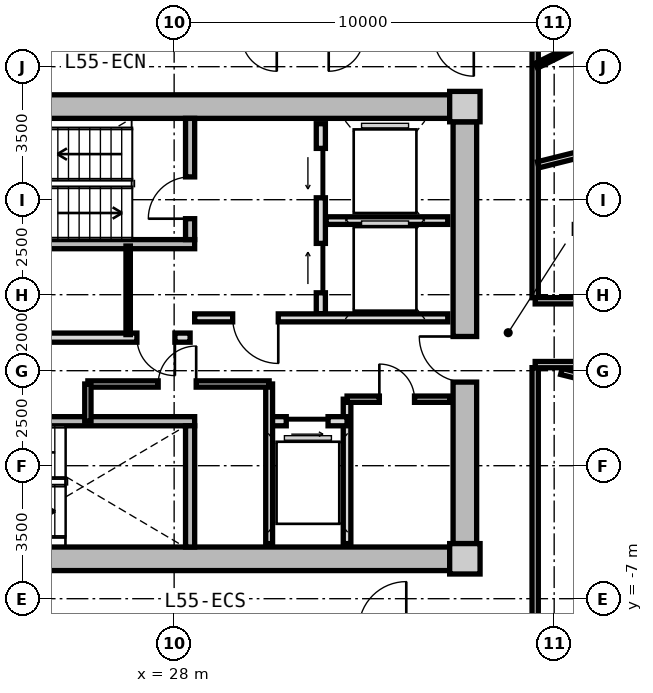
"""IFC4 building model, lengths in metres.
Left out: names, types, materials, properties, quantities, classifications, styles, units other than length and angle.
Written with IfcOpenShell. Run it as: python <this file> out.ifc"""

import sys

from ifc_helpers import new_model, si_unit, direction, frame, frame_2d, origin, origin_2d, place, context, subcontext, project, spatial, rectangle, extrude, source, transform, mapped, element, fill, save


model = new_model("IFC4")
c1 = context("Model", 3, precision=1e-05, world=origin(), true_north=direction((0.0, 1.0)))
c2 = subcontext(c1, "Body", "Model", "MODEL_VIEW")
j1 = project(units=[si_unit("LENGTHUNIT", "METRE"), si_unit("PLANEANGLEUNIT", "RADIAN")], contexts=[c1])
p1 = place(None, origin())
s1 = spatial("IfcSite", under=j1, at=p1, CompositionType="ELEMENT")
p2 = place(p1, origin())
s2 = spatial("IfcBuilding", under=s1, at=p2, CompositionType="ELEMENT")
p3 = place(p2, frame((0.0, 0.0, 177.0)))
s3 = spatial("IfcBuildingStorey", under=s2, at=p3, CompositionType="ELEMENT", Elevation=177.0)
m1 = source(origin(), c2, "Body", "SweptSolid", [
    extrude(rectangle(XDim=0.8, YDim=0.8, at=origin_2d()), origin(), (0.0, 0.0, 1.0), 3.05),
])
for number, where, z_axis, x_axis in (
    (1, (35.65, -5.95, 0.0), (0.0, 0.0, 1.0), (1.0, 0.0, 0.0)),
    (2, (35.65, 5.95, 0.0), (0.0, 0.0, 1.0), (1.0, 0.0, 0.0)),
):
    element("IfcColumn", number, at=place(p3, frame(where, z_axis=z_axis, x_axis=x_axis)), inside=s3, PredefinedType="COLUMN", context=c2, shape_type="MappedRepresentation", body=[
        mapped(m1, transform((0.0, 0.0, 0.0), x_axis=(1.0, 0.0, 0.0), y_axis=(0.0, 1.0, 0.0), z_axis=(0.0, 0.0, 1.0), scale=1.0)),
    ])
m2 = source(origin(), c2, "Body", "SweptSolid", [
    extrude(rectangle(XDim=14.5, YDim=0.62, at=frame_2d((7.25, 0.0))), origin(), (0.0, 0.0, 1.0), 2.81),
])
for number, where, z_axis, x_axis in (
    (3, (20.75, 5.95, 0.0), (0.0, 0.0, 1.0), (1.0, 0.0, 0.0)),
    (4, (35.25, -5.95, 0.0), (0.0, 0.0, 1.0), (-1.0, 0.0, 0.0)),
):
    element("IfcWall", number, at=place(p3, frame(where, z_axis=z_axis, x_axis=x_axis)), inside=s3, PredefinedType="SHEAR", context=c2, shape_type="MappedRepresentation", body=[
        mapped(m2, transform((0.0, 0.0, 0.0), x_axis=(1.0, 0.0, 0.0), y_axis=(0.0, 1.0, 0.0), z_axis=(0.0, 0.0, 1.0), scale=1.0)),
    ])
m3 = source(origin(), c2, "Body", "SweptSolid", [
    extrude(rectangle(XDim=11.1, YDim=0.62, at=frame_2d((5.55, 0.0))), origin(), (0.0, 0.0, 1.0), 2.81),
])
p4 = place(p3, frame((35.65, 5.55, 0.0), z_axis=(0.0, 0.0, 1.0), x_axis=(0.0, -1.0, 0.0)))
e5 = element("IfcWall", 5, at=p4, inside=s3, PredefinedType="SHEAR", context=c2, shape_type="MappedRepresentation", body=[
    mapped(m3, transform((0.0, 0.0, 0.0), x_axis=(1.0, 0.0, 0.0), y_axis=(0.0, 1.0, 0.0), z_axis=(0.0, 0.0, 1.0), scale=1.0)),
])
p5 = place(p4, frame((5.65, 0.0, 0.0)))
e6 = element("IfcOpeningElement", 6, at=p5, cuts=e5, PredefinedType="OPENING", context=c2, shape_type="SweptSolid", body=[
    extrude(rectangle(XDim=1.2, YDim=2.15, at=frame_2d((0.6, 1.075))), frame((0.0, 0.32, 0.0), z_axis=(0.0, -1.0, 0.0), x_axis=(1.0, 0.0, 0.0)), (0.0, 0.0, 1.0), 0.64),
])
m4 = source(origin(), c2, "Body", "SweptSolid", [
    extrude(rectangle(XDim=7.88, YDim=0.24, at=frame_2d((3.94, 0.0))), origin(), (0.0, 0.0, 1.0), 2.81),
])
p6 = place(p3, frame((20.66, 2.33, 0.0), z_axis=(0.0, 0.0, 1.0), x_axis=(1.0, 0.0, 0.0)))
e7 = element("IfcWall", 7, at=p6, inside=s3, PredefinedType="PARTITIONING", context=c2, shape_type="MappedRepresentation", body=[
    mapped(m4, transform((0.0, 0.0, 0.0), x_axis=(1.0, 0.0, 0.0), y_axis=(0.0, 1.0, 0.0), z_axis=(0.0, 0.0, 1.0), scale=1.0)),
])
m5 = source(origin(), c2, "Body", "SweptSolid", [
    extrude(rectangle(XDim=3.19, YDim=0.24, at=frame_2d((1.595, 0.0))), origin(), (0.0, 0.0, 1.0), 2.81),
])
p7 = place(p3, frame((28.42, 2.45, 0.0), z_axis=(0.0, 0.0, 1.0), x_axis=(0.0, 1.0, 0.0)))
e8 = element("IfcWall", 8, at=p7, inside=s3, PredefinedType="PARTITIONING", context=c2, shape_type="MappedRepresentation", body=[
    mapped(m5, transform((0.0, 0.0, 0.0), x_axis=(1.0, 0.0, 0.0), y_axis=(0.0, 1.0, 0.0), z_axis=(0.0, 0.0, 1.0), scale=1.0)),
])
p8 = place(p7, frame((0.55, 0.0, 0.0)))
e9 = element("IfcOpeningElement", 9, at=p8, cuts=e8, PredefinedType="OPENING", context=c2, shape_type="SweptSolid", body=[
    extrude(rectangle(XDim=1.1, YDim=2.15, at=frame_2d((0.55, 1.075))), frame((0.0, 0.13, 0.0), z_axis=(0.0, -1.0, 0.0), x_axis=(1.0, 0.0, 0.0)), (0.0, 0.0, 1.0), 0.26),
])
p9 = place(p3, frame((20.66, -2.33, 0.0), z_axis=(0.0, 0.0, 1.0), x_axis=(1.0, 0.0, 0.0)))
e10 = element("IfcWall", 10, at=p9, inside=s3, PredefinedType="PARTITIONING", context=c2, shape_type="MappedRepresentation", body=[
    mapped(m4, transform((0.0, 0.0, 0.0), x_axis=(1.0, 0.0, 0.0), y_axis=(0.0, 1.0, 0.0), z_axis=(0.0, 0.0, 1.0), scale=1.0)),
])
p10 = place(p9, frame((1.0, 0.0, 0.0)))
e11 = element("IfcOpeningElement", 11, at=p10, cuts=e10, PredefinedType="OPENING", context=c2, shape_type="SweptSolid", body=[
    extrude(rectangle(XDim=1.1, YDim=2.15, at=frame_2d((0.55, 1.075))), frame((0.0, 0.13, 0.0), z_axis=(0.0, -1.0, 0.0), x_axis=(1.0, 0.0, 0.0)), (0.0, 0.0, 1.0), 0.26),
])
p11 = place(p3, frame((28.42, -5.64, 0.0), z_axis=(0.0, 0.0, 1.0), x_axis=(0.0, 1.0, 0.0)))
e12 = element("IfcWall", 12, at=p11, inside=s3, PredefinedType="PARTITIONING", context=c2, shape_type="MappedRepresentation", body=[
    mapped(m5, transform((0.0, 0.0, 0.0), x_axis=(1.0, 0.0, 0.0), y_axis=(0.0, 1.0, 0.0), z_axis=(0.0, 0.0, 1.0), scale=1.0)),
])
m6 = source(origin(), c2, "Body", "SweptSolid", [
    extrude(rectangle(XDim=5.0, YDim=0.24, at=frame_2d((2.5, 0.0))), origin(), (0.0, 0.0, 1.0), 2.795),
])
p12 = place(p3, frame((31.86, 0.5, 0.0), z_axis=(0.0, 0.0, 1.0), x_axis=(0.0, 1.0, 0.0)))
e13 = element("IfcWall", 13, at=p12, inside=s3, PredefinedType="PARTITIONING", context=c2, shape_type="MappedRepresentation", body=[
    mapped(m6, transform((0.0, 0.0, 0.0), x_axis=(1.0, 0.0, 0.0), y_axis=(0.0, 1.0, 0.0), z_axis=(0.0, 0.0, 1.0), scale=1.0)),
])
p13 = place(p12, frame((3.05, 0.0, 0.0)))
e14 = element("IfcOpeningElement", 14, at=p13, cuts=e13, PredefinedType="OPENING", context=c2, shape_type="SweptSolid", body=[
    extrude(rectangle(XDim=1.3, YDim=2.2, at=frame_2d((0.65, 1.1))), frame((0.0, 0.13, 0.0), z_axis=(0.0, -1.0, 0.0), x_axis=(1.0, 0.0, 0.0)), (0.0, 0.0, 1.0), 0.26),
])
p14 = place(p12, frame((0.55, 0.0, 0.0)))
e15 = element("IfcOpeningElement", 15, at=p14, cuts=e13, PredefinedType="OPENING", context=c2, shape_type="SweptSolid", body=[
    extrude(rectangle(XDim=1.3, YDim=2.2, at=frame_2d((0.65, 1.1))), frame((0.0, 0.13, 0.0), z_axis=(0.0, -1.0, 0.0), x_axis=(1.0, 0.0, 0.0)), (0.0, 0.0, 1.0), 0.26),
])
m7 = source(origin(), c2, "Body", "SweptSolid", [
    extrude(rectangle(XDim=3.2, YDim=0.2, at=frame_2d((1.6, 0.0))), origin(), (0.0, 0.0, 1.0), 2.795),
])
p15 = place(p3, frame((32.0, 2.95, 0.0), z_axis=(0.0, 0.0, 1.0), x_axis=(1.0, 0.0, 0.0)))
e16 = element("IfcWall", 16, at=p15, inside=s3, PredefinedType="PARTITIONING", context=c2, shape_type="MappedRepresentation", body=[
    mapped(m7, transform((0.0, 0.0, 0.0), x_axis=(1.0, 0.0, 0.0), y_axis=(0.0, 1.0, 0.0), z_axis=(0.0, 0.0, 1.0), scale=1.0)),
])
m8 = source(origin(), c2, "Body", "SweptSolid", [
    extrude(rectangle(XDim=6.66, YDim=0.21, at=frame_2d((3.33, 0.0))), origin(), (0.0, 0.0, 1.0), 2.795),
])
p16 = place(p3, frame((28.54, 0.39, 0.0), z_axis=(0.0, 0.0, 1.0), x_axis=(1.0, 0.0, 0.0)))
e17 = element("IfcWall", 17, at=p16, inside=s3, PredefinedType="PARTITIONING", context=c2, shape_type="MappedRepresentation", body=[
    mapped(m8, transform((0.0, 0.0, 0.0), x_axis=(1.0, 0.0, 0.0), y_axis=(0.0, 1.0, 0.0), z_axis=(0.0, 0.0, 1.0), scale=1.0)),
])
p17 = place(p16, frame((1.0, 0.0, 0.0)))
e18 = element("IfcOpeningElement", 18, at=p17, cuts=e17, PredefinedType="OPENING", context=c2, shape_type="SweptSolid", body=[
    extrude(rectangle(XDim=1.2, YDim=2.15, at=frame_2d((0.6, 1.075))), frame((0.0, 0.115, 0.0), z_axis=(0.0, -1.0, 0.0), x_axis=(1.0, 0.0, 0.0)), (0.0, 0.0, 1.0), 0.23),
])
m9 = source(origin(), c2, "Body", "SweptSolid", [
    extrude(rectangle(XDim=7.62, YDim=0.24, at=frame_2d((3.81, 0.0))), origin(), (0.0, 0.0, 1.0), 2.795),
])
p18 = place(p3, frame((20.8, -0.13, 0.0), z_axis=(0.0, 0.0, 1.0), x_axis=(1.0, 0.0, 0.0)))
e19 = element("IfcWall", 19, at=p18, inside=s3, PredefinedType="PARTITIONING", context=c2, shape_type="MappedRepresentation", body=[
    mapped(m9, transform((0.0, 0.0, 0.0), x_axis=(1.0, 0.0, 0.0), y_axis=(0.0, 1.0, 0.0), z_axis=(0.0, 0.0, 1.0), scale=1.0)),
])
p19 = place(p18, frame((6.22, 0.0, 0.0)))
e20 = element("IfcOpeningElement", 20, at=p19, cuts=e19, PredefinedType="OPENING", context=c2, shape_type="SweptSolid", body=[
    extrude(rectangle(XDim=1.0, YDim=2.1, at=frame_2d((0.5, 1.05))), frame((0.0, 0.13, 0.0), z_axis=(0.0, -1.0, 0.0), x_axis=(1.0, 0.0, 0.0)), (0.0, 0.0, 1.0), 0.26),
])
p20 = place(p18, frame((2.4, 0.0, 0.0)))
e21 = element("IfcOpeningElement", 21, at=p20, cuts=e19, PredefinedType="OPENING", context=c2, shape_type="SweptSolid", body=[
    extrude(rectangle(XDim=1.0, YDim=2.1, at=frame_2d((0.5, 1.05))), frame((0.0, 0.13, 0.0), z_axis=(0.0, -1.0, 0.0), x_axis=(1.0, 0.0, 0.0)), (0.0, 0.0, 1.0), 0.26),
])
m10 = source(origin(), c2, "Body", "SweptSolid", [
    extrude(rectangle(XDim=2.33, YDim=0.115, at=frame_2d((1.165, 0.0))), origin(), (0.0, 0.0, 1.0), 2.795),
])
p21 = place(p3, frame((26.79, -0.05, 0.0), z_axis=(0.0, 0.0, 1.0), x_axis=(0.0, 1.0, 0.0)))
e22 = element("IfcWall", 22, at=p21, inside=s3, PredefinedType="PARTITIONING", context=c2, shape_type="MappedRepresentation", body=[
    mapped(m10, transform((0.0, 0.0, 0.0), x_axis=(1.0, 0.0, 0.0), y_axis=(0.0, 1.0, 0.0), z_axis=(0.0, 0.0, 1.0), scale=1.0)),
])
m11 = source(origin(), c2, "Body", "SweptSolid", [
    extrude(rectangle(XDim=3.8, YDim=0.2, at=frame_2d((1.9, 0.0))), origin(), (0.0, 0.0, 1.0), 2.795),
])
p22 = place(p3, frame((32.55, -5.55, 0.0), z_axis=(0.0, 0.0, 1.0), x_axis=(0.0, 1.0, 0.0)))
e23 = element("IfcWall", 23, at=p22, inside=s3, PredefinedType="PARTITIONING", context=c2, shape_type="MappedRepresentation", body=[
    mapped(m11, transform((0.0, 0.0, 0.0), x_axis=(1.0, 0.0, 0.0), y_axis=(0.0, 1.0, 0.0), z_axis=(0.0, 0.0, 1.0), scale=1.0)),
])
m12 = source(origin(), c2, "Body", "SweptSolid", [
    extrude(rectangle(XDim=2.05, YDim=0.24, at=frame_2d((1.025, 0.0))), origin(), (0.0, 0.0, 1.0), 2.795),
])
p23 = place(p3, frame((30.5, -2.33, 0.0), z_axis=(0.0, 0.0, 1.0), x_axis=(1.0, 0.0, 0.0)))
e24 = element("IfcWall", 24, at=p23, inside=s3, PredefinedType="PARTITIONING", context=c2, shape_type="MappedRepresentation", body=[
    mapped(m12, transform((0.0, 0.0, 0.0), x_axis=(1.0, 0.0, 0.0), y_axis=(0.0, 1.0, 0.0), z_axis=(0.0, 0.0, 1.0), scale=1.0)),
])
p24 = place(p23, frame((0.45, 0.0, 0.0)))
e25 = element("IfcOpeningElement", 25, at=p24, cuts=e24, PredefinedType="OPENING", context=c2, shape_type="SweptSolid", body=[
    extrude(rectangle(XDim=1.1, YDim=2.2, at=frame_2d((0.55, 1.1))), frame((0.0, 0.13, 0.0), z_axis=(0.0, -1.0, 0.0), x_axis=(1.0, 0.0, 0.0)), (0.0, 0.0, 1.0), 0.26),
])
m13 = source(origin(), c2, "Body", "SweptSolid", [
    extrude(rectangle(XDim=4.2, YDim=0.18, at=frame_2d((2.1, 0.0))), origin(), (0.0, 0.0, 1.0), 2.795),
])
p25 = place(p3, frame((30.5, -5.55, 0.0), z_axis=(0.0, 0.0, 1.0), x_axis=(0.0, 1.0, 0.0)))
e26 = element("IfcWall", 26, at=p25, inside=s3, PredefinedType="PARTITIONING", context=c2, shape_type="MappedRepresentation", body=[
    mapped(m13, transform((0.0, 0.0, 0.0), x_axis=(1.0, 0.0, 0.0), y_axis=(0.0, 1.0, 0.0), z_axis=(0.0, 0.0, 1.0), scale=1.0)),
])
m14 = source(origin(), c2, "Body", "SweptSolid", [
    extrude(rectangle(XDim=4.77, YDim=0.165, at=frame_2d((2.385, 0.0))), origin(), (0.0, 0.0, 1.0), 2.795),
])
p26 = place(p3, frame((25.73, -1.35, 0.0), z_axis=(0.0, 0.0, 1.0), x_axis=(1.0, 0.0, 0.0)))
e27 = element("IfcWall", 27, at=p26, inside=s3, PredefinedType="PARTITIONING", context=c2, shape_type="MappedRepresentation", body=[
    mapped(m14, transform((0.0, 0.0, 0.0), x_axis=(1.0, 0.0, 0.0), y_axis=(0.0, 1.0, 0.0), z_axis=(0.0, 0.0, 1.0), scale=1.0)),
])
p27 = place(p26, frame((1.85, 0.0, 0.0)))
e28 = element("IfcOpeningElement", 28, at=p27, cuts=e27, PredefinedType="OPENING", context=c2, shape_type="SweptSolid", body=[
    extrude(rectangle(XDim=1.0, YDim=2.1, at=frame_2d((0.5, 1.05))), frame((0.0, 0.093, 0.0), z_axis=(0.0, -1.0, 0.0), x_axis=(1.0, 0.0, 0.0)), (0.0, 0.0, 1.0), 0.185),
])
m15 = source(origin(), c2, "Body", "SweptSolid", [
    extrude(rectangle(XDim=0.98, YDim=0.165, at=frame_2d((0.49, 0.0))), origin(), (0.0, 0.0, 1.0), 2.795),
])
p28 = place(p3, frame((25.73, -2.33, 0.0), z_axis=(0.0, 0.0, 1.0), x_axis=(0.0, 1.0, 0.0)))
e29 = element("IfcWall", 29, at=p28, inside=s3, PredefinedType="PARTITIONING", context=c2, shape_type="MappedRepresentation", body=[
    mapped(m15, transform((0.0, 0.0, 0.0), x_axis=(1.0, 0.0, 0.0), y_axis=(0.0, 1.0, 0.0), z_axis=(0.0, 0.0, 1.0), scale=1.0)),
])
m16 = source(origin(), c2, "Body", "SweptSolid", [
    extrude(rectangle(XDim=2.7, YDim=0.165, at=frame_2d((1.35, 0.0))), origin(), (0.0, 0.0, 1.0), 2.795),
])
p29 = place(p3, frame((32.55, -1.75, 0.0), z_axis=(0.0, 0.0, 1.0), x_axis=(1.0, 0.0, 0.0)))
e30 = element("IfcWall", 30, at=p29, inside=s3, PredefinedType="PARTITIONING", context=c2, shape_type="MappedRepresentation", body=[
    mapped(m16, transform((0.0, 0.0, 0.0), x_axis=(1.0, 0.0, 0.0), y_axis=(0.0, 1.0, 0.0), z_axis=(0.0, 0.0, 1.0), scale=1.0)),
])
p30 = place(p29, frame((0.85, 0.0, 0.0)))
e31 = element("IfcOpeningElement", 31, at=p30, cuts=e30, PredefinedType="OPENING", context=c2, shape_type="SweptSolid", body=[
    extrude(rectangle(XDim=0.925, YDim=2.1, at=frame_2d((0.462, 1.05))), frame((0.0, 0.093, 0.0), z_axis=(0.0, -1.0, 0.0), x_axis=(1.0, 0.0, 0.0)), (0.0, 0.0, 1.0), 0.185),
])
m17 = source(origin(), c2, "Body", "SweptSolid", [
    extrude(rectangle(XDim=6.88, YDim=0.165, at=frame_2d((3.44, 0.0))), origin(), (0.0, 0.0, 1.0), 2.795),
])
for number, where, z_axis, x_axis in (
    (32, (37.5, 7.8, 0.0), (0.0, 0.0, 1.0), (0.0, -1.0, 0.0)),
    (33, (37.5, -0.92, 0.0), (0.0, 0.0, 1.0), (0.0, -1.0, 0.0)),
):
    element("IfcWall", number, at=place(p3, frame(where, z_axis=z_axis, x_axis=x_axis)), inside=s3, PredefinedType="PARTITIONING", context=c2, shape_type="MappedRepresentation", body=[
        mapped(m17, transform((0.0, 0.0, 0.0), x_axis=(1.0, 0.0, 0.0), y_axis=(0.0, 1.0, 0.0), z_axis=(0.0, 0.0, 1.0), scale=1.0)),
    ])
m18 = source(origin(), c2, "Body", "SweptSolid", [
    extrude(rectangle(XDim=5.564, YDim=0.165, at=frame_2d((2.782, 0.0))), origin(), (0.0, 0.0, 1.0), 2.345),
])
p31 = place(p3, frame((38.19, -1.02, 0.0), z_axis=(0.0, 0.0, 1.0), x_axis=(0.97031260977, -0.241854169533, 0.0)))
e34 = element("IfcWall", 34, at=p31, inside=s3, PredefinedType="PARTITIONING", context=c2, shape_type="MappedRepresentation", body=[
    mapped(m18, transform((0.0, 0.0, 0.0), x_axis=(1.0, 0.0, 0.0), y_axis=(0.0, 1.0, 0.0), z_axis=(0.0, 0.0, 1.0), scale=1.0)),
])
m19 = source(origin(), c2, "Body", "SweptSolid", [
    extrude(rectangle(XDim=6.193, YDim=0.165, at=frame_2d((3.096, 0.0))), origin(), (0.0, 0.0, 1.0), 2.345),
])
p32 = place(p3, frame((37.58, 4.419, 0.0), z_axis=(0.0, 0.0, 1.0), x_axis=(0.970309243466, 0.241867674657, 0.0)))
e35 = element("IfcWall", 35, at=p32, inside=s3, PredefinedType="PARTITIONING", context=c2, shape_type="MappedRepresentation", body=[
    mapped(m19, transform((0.0, 0.0, 0.0), x_axis=(1.0, 0.0, 0.0), y_axis=(0.0, 1.0, 0.0), z_axis=(0.0, 0.0, 1.0), scale=1.0)),
])
m20 = source(origin(), c2, "Body", "SweptSolid", [
    extrude(rectangle(XDim=6.139, YDim=0.165, at=frame_2d((3.069, 0.0))), origin(), (0.0, 0.0, 1.0), 2.795),
])
p33 = place(p3, frame((37.5, 0.84, 0.0), z_axis=(0.0, 0.0, 1.0), x_axis=(1.0, 0.0, 0.0)))
e36 = element("IfcWall", 36, at=p33, inside=s3, PredefinedType="PARTITIONING", context=c2, shape_type="MappedRepresentation", body=[
    mapped(m20, transform((0.0, 0.0, 0.0), x_axis=(1.0, 0.0, 0.0), y_axis=(0.0, 1.0, 0.0), z_axis=(0.0, 0.0, 1.0), scale=1.0)),
])
p34 = place(p33, frame((2.594, 0.0, 0.0)))
e37 = element("IfcOpeningElement", 37, at=p34, cuts=e36, PredefinedType="OPENING", context=c2, shape_type="SweptSolid", body=[
    extrude(rectangle(XDim=0.95, YDim=2.1, at=frame_2d((0.475, 1.05))), frame((0.0, 0.093, 0.0), z_axis=(0.0, -1.0, 0.0), x_axis=(1.0, 0.0, 0.0)), (0.0, 0.0, 1.0), 0.185),
])
p35 = place(p3, frame((43.639, -0.84, 0.0), z_axis=(0.0, 0.0, 1.0), x_axis=(-1.0, 0.0, 0.0)))
e38 = element("IfcWall", 38, at=p35, inside=s3, PredefinedType="PARTITIONING", context=c2, shape_type="MappedRepresentation", body=[
    mapped(m20, transform((0.0, 0.0, 0.0), x_axis=(1.0, 0.0, 0.0), y_axis=(0.0, 1.0, 0.0), z_axis=(0.0, 0.0, 1.0), scale=1.0)),
])
m21 = source(origin(), c2, "Body", "SweptSolid", [
    extrude(rectangle(XDim=2.471, YDim=0.14, at=frame_2d((1.235, 0.0))), origin(), (0.0, 0.0, 1.0), 2.795),
])
p36 = place(p3, frame((37.53, 7.026, 0.0), z_axis=(0.0, 0.0, 1.0), x_axis=(0.895295102372, 0.445473545419, 0.0)))
e39 = element("IfcWall", 39, at=p36, inside=s3, PredefinedType="PARTITIONING", context=c2, shape_type="MappedRepresentation", body=[
    mapped(m21, transform((0.0, 0.0, 0.0), x_axis=(1.0, 0.0, 0.0), y_axis=(0.0, 1.0, 0.0), z_axis=(0.0, 0.0, 1.0), scale=1.0)),
])
m22 = source(origin(), c2, "Body", "SweptSolid", [
    extrude(rectangle(XDim=1.1, YDim=2.15, at=frame_2d((0.55, 1.075))), frame((0.0, 0.025, 0.0), z_axis=(0.0, -1.0, 0.0), x_axis=(1.0, 0.0, 0.0)), (0.0, 0.0, 1.0), 0.05),
])
p37 = place(p8, origin())
e40 = element("IfcDoor", 40, at=p37, inside=s3, OperationType="SINGLE_SWING_LEFT", PredefinedType="DOOR", context=c2, shape_type="MappedRepresentation", body=[
    mapped(m22, transform((0.0, 0.0, 0.0), x_axis=(1.0, 0.0, 0.0), y_axis=(0.0, 1.0, 0.0), z_axis=(0.0, 0.0, 1.0), scale=1.0)),
])
fill(e9, e40)
m23 = source(origin(), c2, "Body", "SweptSolid", [
    extrude(rectangle(XDim=1.3, YDim=2.2, at=frame_2d((0.65, 1.1))), frame((0.0, 0.025, 0.0), z_axis=(0.0, -1.0, 0.0), x_axis=(1.0, 0.0, 0.0)), (0.0, 0.0, 1.0), 0.05),
])
p38 = place(p13, origin())
e41 = element("IfcDoor", 41, at=p38, inside=s3, OperationType="SLIDING_TO_LEFT", PredefinedType="DOOR", context=c2, shape_type="MappedRepresentation", body=[
    mapped(m23, transform((0.0, 0.0, 0.0), x_axis=(1.0, 0.0, 0.0), y_axis=(0.0, 1.0, 0.0), z_axis=(0.0, 0.0, 1.0), scale=1.0)),
])
fill(e14, e41)
p39 = place(p14, origin())
e42 = element("IfcDoor", 42, at=p39, inside=s3, OperationType="SLIDING_TO_RIGHT", PredefinedType="DOOR", context=c2, shape_type="MappedRepresentation", body=[
    mapped(m23, transform((0.0, 0.0, 0.0), x_axis=(1.0, 0.0, 0.0), y_axis=(0.0, 1.0, 0.0), z_axis=(0.0, 0.0, 1.0), scale=1.0)),
])
fill(e15, e42)
m24 = source(origin(), c2, "Body", "SweptSolid", [
    extrude(rectangle(XDim=1.2, YDim=2.15, at=frame_2d((0.6, 1.075))), frame((0.0, 0.025, 0.0), z_axis=(0.0, -1.0, 0.0), x_axis=(1.0, 0.0, 0.0)), (0.0, 0.0, 1.0), 0.05),
])
p40 = place(p17, frame((1.2, 0.0, 0.0), z_axis=(0.0, 0.0, 1.0), x_axis=(-1.0, 0.0, 0.0)))
e43 = element("IfcDoor", 43, at=p40, inside=s3, OperationType="SINGLE_SWING_LEFT", PredefinedType="DOOR", context=c2, shape_type="MappedRepresentation", body=[
    mapped(m24, transform((0.0, 0.0, 0.0), x_axis=(1.0, 0.0, 0.0), y_axis=(0.0, 1.0, 0.0), z_axis=(0.0, 0.0, 1.0), scale=1.0)),
])
fill(e18, e43)
p41 = place(p5, frame((1.2, 0.0, 0.0), z_axis=(0.0, 0.0, 1.0), x_axis=(-1.0, 0.0, 0.0)))
e44 = element("IfcDoor", 44, at=p41, inside=s3, OperationType="SINGLE_SWING_RIGHT", PredefinedType="DOOR", context=c2, shape_type="MappedRepresentation", body=[
    mapped(m24, transform((0.0, 0.0, 0.0), x_axis=(1.0, 0.0, 0.0), y_axis=(0.0, 1.0, 0.0), z_axis=(0.0, 0.0, 1.0), scale=1.0)),
])
fill(e6, e44)
m25 = source(origin(), c2, "Body", "SweptSolid", [
    extrude(rectangle(XDim=1.0, YDim=2.1, at=frame_2d((0.5, 1.05))), frame((0.0, 0.025, 0.0), z_axis=(0.0, -1.0, 0.0), x_axis=(1.0, 0.0, 0.0)), (0.0, 0.0, 1.0), 0.05),
])
p42 = place(p19, frame((1.0, 0.0, 0.0), z_axis=(0.0, 0.0, 1.0), x_axis=(-1.0, 0.0, 0.0)))
e45 = element("IfcDoor", 45, at=p42, inside=s3, OperationType="SINGLE_SWING_LEFT", PredefinedType="DOOR", context=c2, shape_type="MappedRepresentation", body=[
    mapped(m25, transform((0.0, 0.0, 0.0), x_axis=(1.0, 0.0, 0.0), y_axis=(0.0, 1.0, 0.0), z_axis=(0.0, 0.0, 1.0), scale=1.0)),
])
fill(e20, e45)
m26 = source(origin(), c2, "Body", "SweptSolid", [
    extrude(rectangle(XDim=1.1, YDim=2.2, at=frame_2d((0.55, 1.1))), frame((0.0, 0.025, 0.0), z_axis=(0.0, -1.0, 0.0), x_axis=(1.0, 0.0, 0.0)), (0.0, 0.0, 1.0), 0.05),
])
p43 = place(p24, frame((1.1, 0.0, 0.0), z_axis=(0.0, 0.0, 1.0), x_axis=(-1.0, 0.0, 0.0)))
e46 = element("IfcDoor", 46, at=p43, inside=s3, OperationType="SLIDING_TO_RIGHT", PredefinedType="DOOR", context=c2, shape_type="MappedRepresentation", body=[
    mapped(m26, transform((0.0, 0.0, 0.0), x_axis=(1.0, 0.0, 0.0), y_axis=(0.0, 1.0, 0.0), z_axis=(0.0, 0.0, 1.0), scale=1.0)),
])
fill(e25, e46)
p44 = place(p27, origin())
e47 = element("IfcDoor", 47, at=p44, inside=s3, OperationType="SINGLE_SWING_RIGHT", PredefinedType="DOOR", context=c2, shape_type="MappedRepresentation", body=[
    mapped(m25, transform((0.0, 0.0, 0.0), x_axis=(1.0, 0.0, 0.0), y_axis=(0.0, 1.0, 0.0), z_axis=(0.0, 0.0, 1.0), scale=1.0)),
])
fill(e28, e47)
m27 = source(origin(), c2, "Body", "SweptSolid", [
    extrude(rectangle(XDim=0.925, YDim=2.1, at=frame_2d((0.462, 1.05))), frame((0.0, 0.025, 0.0), z_axis=(0.0, -1.0, 0.0), x_axis=(1.0, 0.0, 0.0)), (0.0, 0.0, 1.0), 0.05),
])
p45 = place(p30, origin())
e48 = element("IfcDoor", 48, at=p45, inside=s3, OperationType="SINGLE_SWING_LEFT", PredefinedType="DOOR", context=c2, shape_type="MappedRepresentation", body=[
    mapped(m27, transform((0.0, 0.0, 0.0), x_axis=(1.0, 0.0, 0.0), y_axis=(0.0, 1.0, 0.0), z_axis=(0.0, 0.0, 1.0), scale=1.0)),
])
fill(e31, e48)
save(model, sys.argv[1])
